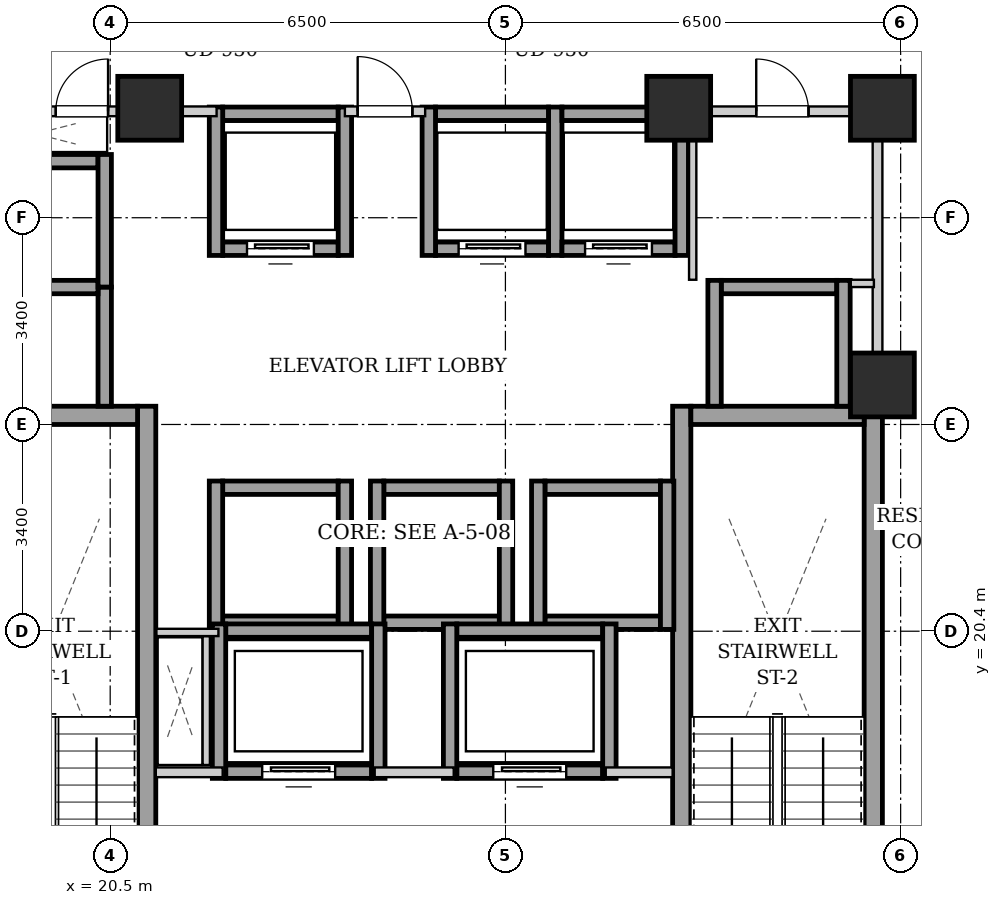
"""IFC4 building model, lengths in metres.
Left out: names, types, materials, properties, quantities, classifications, styles, units other than length and angle.
Written with IfcOpenShell. Run it as: python <this file> out.ifc"""

import sys

from ifc_helpers import new_model, si_unit, direction, frame, frame_2d, origin, origin_2d, place, context, subcontext, project, spatial, rectangle, extrude, element, fill, save


model = new_model("IFC4")
c1 = context("Model", 3, precision=1e-05, world=origin(), true_north=direction((0.0, 1.0)))
c2 = subcontext(c1, "Body", "Model", "MODEL_VIEW")
j1 = project(units=[si_unit("LENGTHUNIT", "METRE"), si_unit("PLANEANGLEUNIT", "RADIAN")], contexts=[c1])
p1 = place(None, origin())
s1 = spatial("IfcSite", under=j1, at=p1, CompositionType="ELEMENT")
p2 = place(p1, origin())
s2 = spatial("IfcBuilding", under=s1, at=p2, CompositionType="ELEMENT")
p3 = place(p2, frame((0.0, 0.0, 107.1)))
s3 = spatial("IfcBuildingStorey", under=s2, at=p3, CompositionType="ELEMENT", Elevation=107.1)
for number, where, z_axis, x_axis in (
    (1, (21.15, 29.0, 0.0), (0.0, 0.0, 1.0), (1.0, 0.0, 0.0)),
    (2, (29.85, 29.0, 0.0), (0.0, 0.0, 1.0), (1.0, 0.0, 0.0)),
    (3, (33.2, 29.0, 0.0), (0.0, 0.0, 1.0), (1.0, 0.0, 0.0)),
    (4, (33.2, 24.45, 0.0), (0.0, 0.0, 1.0), (1.0, 0.0, 0.0)),
):
    element("IfcColumn", number, at=place(p3, frame(where, z_axis=z_axis, x_axis=x_axis)), inside=s3, PredefinedType="COLUMN", context=c2, shape_type="SweptSolid", body=[
        extrude(rectangle(XDim=1.05, YDim=1.05, at=origin_2d()), origin(), (0.0, 0.0, 1.0), 3.2),
    ])
p4 = place(p3, frame((21.1, 15.1, 0.0), z_axis=(0.0, 0.0, 1.0), x_axis=(0.0, 1.0, 0.0)))
e5 = element("IfcWall", 5, at=p4, inside=s3, PredefinedType="SHEAR", context=c2, shape_type="SweptSolid", body=[
    extrude(rectangle(XDim=9.0, YDim=0.3, at=frame_2d((4.5, 0.0))), origin(), (0.0, 0.0, 1.0), 2.94),
])
p5 = place(p3, frame((18.1, 23.95, 0.0), z_axis=(0.0, 0.0, 1.0), x_axis=(1.0, 0.0, 0.0)))
e6 = element("IfcWall", 6, at=p5, inside=s3, PredefinedType="SHEAR", context=c2, shape_type="SweptSolid", body=[
    extrude(rectangle(XDim=2.85, YDim=0.3, at=frame_2d((1.425, 0.0))), origin(), (0.0, 0.0, 1.0), 2.94),
])
for number, where, z_axis, x_axis in (
    (7, (29.9, 15.1, 0.0), (0.0, 0.0, 1.0), (0.0, 1.0, 0.0)),
    (8, (33.05, 15.1, 0.0), (0.0, 0.0, 1.0), (0.0, 1.0, 0.0)),
):
    element("IfcWall", number, at=place(p3, frame(where, z_axis=z_axis, x_axis=x_axis)), inside=s3, PredefinedType="SHEAR", context=c2, shape_type="SweptSolid", body=[
        extrude(rectangle(XDim=9.0, YDim=0.3, at=frame_2d((4.5, 0.0))), origin(), (0.0, 0.0, 1.0), 2.94),
    ])
p6 = place(p3, frame((30.05, 23.95, 0.0), z_axis=(0.0, 0.0, 1.0), x_axis=(1.0, 0.0, 0.0)))
e9 = element("IfcWall", 9, at=p6, inside=s3, PredefinedType="SHEAR", context=c2, shape_type="SweptSolid", body=[
    extrude(rectangle(XDim=2.85, YDim=0.3, at=frame_2d((1.425, 0.0))), origin(), (0.0, 0.0, 1.0), 2.94),
])
p7 = place(p3, frame((22.35, 26.69, 0.0), z_axis=(0.0, 0.0, 1.0), x_axis=(1.0, 0.0, 0.0)))
e10 = element("IfcWall", 10, at=p7, inside=s3, PredefinedType="SHEAR", context=c2, shape_type="SweptSolid", body=[
    extrude(rectangle(XDim=1.9, YDim=0.22, at=frame_2d((0.95, 0.0))), origin(), (0.0, 0.0, 1.0), 2.94),
])
p8 = place(p7, frame((0.4, 0.0, 0.0)))
e11 = element("IfcOpeningElement", 11, at=p8, cuts=e10, PredefinedType="OPENING", context=c2, shape_type="SweptSolid", body=[
    extrude(rectangle(XDim=1.1, YDim=2.15, at=frame_2d((0.55, 1.075))), frame((0.0, 0.12, 0.0), z_axis=(0.0, -1.0, 0.0), x_axis=(1.0, 0.0, 0.0)), (0.0, 0.0, 1.0), 0.24),
])
p9 = place(p3, frame((22.35, 28.91, 0.0), z_axis=(0.0, 0.0, 1.0), x_axis=(1.0, 0.0, 0.0)))
e12 = element("IfcWall", 12, at=p9, inside=s3, PredefinedType="SHEAR", context=c2, shape_type="SweptSolid", body=[
    extrude(rectangle(XDim=1.9, YDim=0.22, at=frame_2d((0.95, 0.0))), origin(), (0.0, 0.0, 1.0), 2.94),
])
for number, where, z_axis, x_axis in (
    (13, (22.24, 26.58, 0.0), (0.0, 0.0, 1.0), (0.0, 1.0, 0.0)),
    (14, (24.36, 26.58, 0.0), (0.0, 0.0, 1.0), (0.0, 1.0, 0.0)),
):
    element("IfcWall", number, at=place(p3, frame(where, z_axis=z_axis, x_axis=x_axis)), inside=s3, PredefinedType="SHEAR", context=c2, shape_type="SweptSolid", body=[
        extrude(rectangle(XDim=2.44, YDim=0.22, at=frame_2d((1.22, 0.0))), origin(), (0.0, 0.0, 1.0), 2.94),
    ])
p10 = place(p3, frame((25.85, 26.69, 0.0), z_axis=(0.0, 0.0, 1.0), x_axis=(1.0, 0.0, 0.0)))
e15 = element("IfcWall", 15, at=p10, inside=s3, PredefinedType="SHEAR", context=c2, shape_type="SweptSolid", body=[
    extrude(rectangle(XDim=1.86, YDim=0.22, at=frame_2d((0.93, 0.0))), origin(), (0.0, 0.0, 1.0), 2.94),
])
p11 = place(p10, frame((0.38, 0.0, 0.0)))
e16 = element("IfcOpeningElement", 16, at=p11, cuts=e15, PredefinedType="OPENING", context=c2, shape_type="SweptSolid", body=[
    extrude(rectangle(XDim=1.1, YDim=2.15, at=frame_2d((0.55, 1.075))), frame((0.0, 0.12, 0.0), z_axis=(0.0, -1.0, 0.0), x_axis=(1.0, 0.0, 0.0)), (0.0, 0.0, 1.0), 0.24),
])
p12 = place(p3, frame((25.85, 28.91, 0.0), z_axis=(0.0, 0.0, 1.0), x_axis=(1.0, 0.0, 0.0)))
e17 = element("IfcWall", 17, at=p12, inside=s3, PredefinedType="SHEAR", context=c2, shape_type="SweptSolid", body=[
    extrude(rectangle(XDim=1.86, YDim=0.22, at=frame_2d((0.93, 0.0))), origin(), (0.0, 0.0, 1.0), 2.94),
])
for number, where, z_axis, x_axis in (
    (18, (25.74, 26.58, 0.0), (0.0, 0.0, 1.0), (0.0, 1.0, 0.0)),
    (19, (27.82, 26.58, 0.0), (0.0, 0.0, 1.0), (0.0, 1.0, 0.0)),
):
    element("IfcWall", number, at=place(p3, frame(where, z_axis=z_axis, x_axis=x_axis)), inside=s3, PredefinedType="SHEAR", context=c2, shape_type="SweptSolid", body=[
        extrude(rectangle(XDim=2.44, YDim=0.22, at=frame_2d((1.22, 0.0))), origin(), (0.0, 0.0, 1.0), 2.94),
    ])
p13 = place(p3, frame((27.93, 26.69, 0.0), z_axis=(0.0, 0.0, 1.0), x_axis=(1.0, 0.0, 0.0)))
e20 = element("IfcWall", 20, at=p13, inside=s3, PredefinedType="SHEAR", context=c2, shape_type="SweptSolid", body=[
    extrude(rectangle(XDim=1.86, YDim=0.22, at=frame_2d((0.93, 0.0))), origin(), (0.0, 0.0, 1.0), 2.94),
])
p14 = place(p13, frame((0.38, 0.0, 0.0)))
e21 = element("IfcOpeningElement", 21, at=p14, cuts=e20, PredefinedType="OPENING", context=c2, shape_type="SweptSolid", body=[
    extrude(rectangle(XDim=1.1, YDim=2.15, at=frame_2d((0.55, 1.075))), frame((0.0, 0.12, 0.0), z_axis=(0.0, -1.0, 0.0), x_axis=(1.0, 0.0, 0.0)), (0.0, 0.0, 1.0), 0.24),
])
p15 = place(p3, frame((27.93, 28.91, 0.0), z_axis=(0.0, 0.0, 1.0), x_axis=(1.0, 0.0, 0.0)))
e22 = element("IfcWall", 22, at=p15, inside=s3, PredefinedType="SHEAR", context=c2, shape_type="SweptSolid", body=[
    extrude(rectangle(XDim=1.86, YDim=0.22, at=frame_2d((0.93, 0.0))), origin(), (0.0, 0.0, 1.0), 2.94),
])
p16 = place(p3, frame((29.9, 26.58, 0.0), z_axis=(0.0, 0.0, 1.0), x_axis=(0.0, 1.0, 0.0)))
e23 = element("IfcWall", 23, at=p16, inside=s3, PredefinedType="SHEAR", context=c2, shape_type="SweptSolid", body=[
    extrude(rectangle(XDim=2.44, YDim=0.22, at=frame_2d((1.22, 0.0))), origin(), (0.0, 0.0, 1.0), 2.94),
])
for number, where, z_axis, x_axis in (
    (24, (22.35, 20.54, 0.0), (0.0, 0.0, 1.0), (1.0, 0.0, 0.0)),
    (25, (22.35, 22.76, 0.0), (0.0, 0.0, 1.0), (1.0, 0.0, 0.0)),
):
    element("IfcWall", number, at=place(p3, frame(where, z_axis=z_axis, x_axis=x_axis)), inside=s3, PredefinedType="SHEAR", context=c2, shape_type="SweptSolid", body=[
        extrude(rectangle(XDim=1.9, YDim=0.22, at=frame_2d((0.95, 0.0))), origin(), (0.0, 0.0, 1.0), 2.94),
    ])
for number, where, z_axis, x_axis in (
    (26, (22.24, 20.43, 0.0), (0.0, 0.0, 1.0), (0.0, 1.0, 0.0)),
    (27, (24.36, 20.43, 0.0), (0.0, 0.0, 1.0), (0.0, 1.0, 0.0)),
):
    element("IfcWall", number, at=place(p3, frame(where, z_axis=z_axis, x_axis=x_axis)), inside=s3, PredefinedType="SHEAR", context=c2, shape_type="SweptSolid", body=[
        extrude(rectangle(XDim=2.44, YDim=0.22, at=frame_2d((1.22, 0.0))), origin(), (0.0, 0.0, 1.0), 2.94),
    ])
for number, where, z_axis, x_axis in (
    (28, (25.0, 20.54, 0.0), (0.0, 0.0, 1.0), (1.0, 0.0, 0.0)),
    (29, (25.0, 22.76, 0.0), (0.0, 0.0, 1.0), (1.0, 0.0, 0.0)),
):
    element("IfcWall", number, at=place(p3, frame(where, z_axis=z_axis, x_axis=x_axis)), inside=s3, PredefinedType="SHEAR", context=c2, shape_type="SweptSolid", body=[
        extrude(rectangle(XDim=1.9, YDim=0.22, at=frame_2d((0.95, 0.0))), origin(), (0.0, 0.0, 1.0), 2.94),
    ])
for number, where, z_axis, x_axis in (
    (30, (24.89, 20.43, 0.0), (0.0, 0.0, 1.0), (0.0, 1.0, 0.0)),
    (31, (27.01, 20.43, 0.0), (0.0, 0.0, 1.0), (0.0, 1.0, 0.0)),
):
    element("IfcWall", number, at=place(p3, frame(where, z_axis=z_axis, x_axis=x_axis)), inside=s3, PredefinedType="SHEAR", context=c2, shape_type="SweptSolid", body=[
        extrude(rectangle(XDim=2.44, YDim=0.22, at=frame_2d((1.22, 0.0))), origin(), (0.0, 0.0, 1.0), 2.94),
    ])
for number, where, z_axis, x_axis in (
    (32, (27.65, 20.54, 0.0), (0.0, 0.0, 1.0), (1.0, 0.0, 0.0)),
    (33, (27.65, 22.76, 0.0), (0.0, 0.0, 1.0), (1.0, 0.0, 0.0)),
):
    element("IfcWall", number, at=place(p3, frame(where, z_axis=z_axis, x_axis=x_axis)), inside=s3, PredefinedType="SHEAR", context=c2, shape_type="SweptSolid", body=[
        extrude(rectangle(XDim=1.9, YDim=0.22, at=frame_2d((0.95, 0.0))), origin(), (0.0, 0.0, 1.0), 2.94),
    ])
for number, where, z_axis, x_axis in (
    (34, (27.54, 20.43, 0.0), (0.0, 0.0, 1.0), (0.0, 1.0, 0.0)),
    (35, (29.66, 20.43, 0.0), (0.0, 0.0, 1.0), (0.0, 1.0, 0.0)),
):
    element("IfcWall", number, at=place(p3, frame(where, z_axis=z_axis, x_axis=x_axis)), inside=s3, PredefinedType="SHEAR", context=c2, shape_type="SweptSolid", body=[
        extrude(rectangle(XDim=2.44, YDim=0.22, at=frame_2d((1.22, 0.0))), origin(), (0.0, 0.0, 1.0), 2.94),
    ])
p17 = place(p3, frame((20.41, 24.1, 0.0), z_axis=(0.0, 0.0, 1.0), x_axis=(0.0, 1.0, 0.0)))
e36 = element("IfcWall", 36, at=p17, inside=s3, PredefinedType="SHEAR", context=c2, shape_type="SweptSolid", body=[
    extrude(rectangle(XDim=1.96, YDim=0.22, at=frame_2d((0.98, 0.0))), origin(), (0.0, 0.0, 1.0), 2.94),
])
for number, where, z_axis, x_axis in (
    (37, (18.4, 26.06, 0.0), (0.0, 0.0, 1.0), (1.0, 0.0, 0.0)),
    (38, (18.4, 28.13, 0.0), (0.0, 0.0, 1.0), (1.0, 0.0, 0.0)),
):
    element("IfcWall", number, at=place(p3, frame(where, z_axis=z_axis, x_axis=x_axis)), inside=s3, PredefinedType="SHEAR", context=c2, shape_type="SweptSolid", body=[
        extrude(rectangle(XDim=1.9, YDim=0.22, at=frame_2d((0.95, 0.0))), origin(), (0.0, 0.0, 1.0), 2.94),
    ])
p18 = place(p3, frame((20.41, 26.06, 0.0), z_axis=(0.0, 0.0, 1.0), x_axis=(0.0, 1.0, 0.0)))
e39 = element("IfcWall", 39, at=p18, inside=s3, PredefinedType="SHEAR", context=c2, shape_type="SweptSolid", body=[
    extrude(rectangle(XDim=2.18, YDim=0.22, at=frame_2d((1.09, 0.0))), origin(), (0.0, 0.0, 1.0), 2.94),
])
p19 = place(p3, frame((30.55, 26.06, 0.0), z_axis=(0.0, 0.0, 1.0), x_axis=(1.0, 0.0, 0.0)))
e40 = element("IfcWall", 40, at=p19, inside=s3, PredefinedType="SHEAR", context=c2, shape_type="SweptSolid", body=[
    extrude(rectangle(XDim=1.9, YDim=0.22, at=frame_2d((0.95, 0.0))), origin(), (0.0, 0.0, 1.0), 2.94),
])
for number, where, z_axis, x_axis in (
    (41, (30.44, 24.1, 0.0), (0.0, 0.0, 1.0), (0.0, 1.0, 0.0)),
    (42, (32.56, 24.1, 0.0), (0.0, 0.0, 1.0), (0.0, 1.0, 0.0)),
):
    element("IfcWall", number, at=place(p3, frame(where, z_axis=z_axis, x_axis=x_axis)), inside=s3, PredefinedType="SHEAR", context=c2, shape_type="SweptSolid", body=[
        extrude(rectangle(XDim=2.07, YDim=0.22, at=frame_2d((1.035, 0.0))), origin(), (0.0, 0.0, 1.0), 2.94),
    ])
p20 = place(p3, frame((22.4, 18.09, 0.0), z_axis=(0.0, 0.0, 1.0), x_axis=(1.0, 0.0, 0.0)))
e43 = element("IfcWall", 43, at=p20, inside=s3, PredefinedType="SHEAR", context=c2, shape_type="SweptSolid", body=[
    extrude(rectangle(XDim=2.4, YDim=0.22, at=frame_2d((1.2, 0.0))), origin(), (0.0, 0.0, 1.0), 2.94),
])
p21 = place(p20, frame((0.6, 0.0, 0.0)))
e44 = element("IfcOpeningElement", 44, at=p21, cuts=e43, PredefinedType="OPENING", context=c2, shape_type="SweptSolid", body=[
    extrude(rectangle(XDim=1.2, YDim=2.15, at=frame_2d((0.6, 1.075))), frame((0.0, 0.12, 0.0), z_axis=(0.0, -1.0, 0.0), x_axis=(1.0, 0.0, 0.0)), (0.0, 0.0, 1.0), 0.24),
])
p22 = place(p3, frame((22.4, 20.41, 0.0), z_axis=(0.0, 0.0, 1.0), x_axis=(1.0, 0.0, 0.0)))
e45 = element("IfcWall", 45, at=p22, inside=s3, PredefinedType="SHEAR", context=c2, shape_type="SweptSolid", body=[
    extrude(rectangle(XDim=2.4, YDim=0.22, at=frame_2d((1.2, 0.0))), origin(), (0.0, 0.0, 1.0), 2.94),
])
for number, where, z_axis, x_axis in (
    (46, (22.29, 17.98, 0.0), (0.0, 0.0, 1.0), (0.0, 1.0, 0.0)),
    (47, (24.91, 17.98, 0.0), (0.0, 0.0, 1.0), (0.0, 1.0, 0.0)),
):
    element("IfcWall", number, at=place(p3, frame(where, z_axis=z_axis, x_axis=x_axis)), inside=s3, PredefinedType="SHEAR", context=c2, shape_type="SweptSolid", body=[
        extrude(rectangle(XDim=2.54, YDim=0.22, at=frame_2d((1.27, 0.0))), origin(), (0.0, 0.0, 1.0), 2.94),
    ])
p23 = place(p3, frame((26.2, 18.09, 0.0), z_axis=(0.0, 0.0, 1.0), x_axis=(1.0, 0.0, 0.0)))
e48 = element("IfcWall", 48, at=p23, inside=s3, PredefinedType="SHEAR", context=c2, shape_type="SweptSolid", body=[
    extrude(rectangle(XDim=2.4, YDim=0.22, at=frame_2d((1.2, 0.0))), origin(), (0.0, 0.0, 1.0), 2.94),
])
p24 = place(p23, frame((0.6, 0.0, 0.0)))
e49 = element("IfcOpeningElement", 49, at=p24, cuts=e48, PredefinedType="OPENING", context=c2, shape_type="SweptSolid", body=[
    extrude(rectangle(XDim=1.2, YDim=2.15, at=frame_2d((0.6, 1.075))), frame((0.0, 0.12, 0.0), z_axis=(0.0, -1.0, 0.0), x_axis=(1.0, 0.0, 0.0)), (0.0, 0.0, 1.0), 0.24),
])
p25 = place(p3, frame((26.2, 20.41, 0.0), z_axis=(0.0, 0.0, 1.0), x_axis=(1.0, 0.0, 0.0)))
e50 = element("IfcWall", 50, at=p25, inside=s3, PredefinedType="SHEAR", context=c2, shape_type="SweptSolid", body=[
    extrude(rectangle(XDim=2.4, YDim=0.22, at=frame_2d((1.2, 0.0))), origin(), (0.0, 0.0, 1.0), 2.94),
])
for number, where, z_axis, x_axis in (
    (51, (26.09, 17.98, 0.0), (0.0, 0.0, 1.0), (0.0, 1.0, 0.0)),
    (52, (28.71, 17.98, 0.0), (0.0, 0.0, 1.0), (0.0, 1.0, 0.0)),
):
    element("IfcWall", number, at=place(p3, frame(where, z_axis=z_axis, x_axis=x_axis)), inside=s3, PredefinedType="SHEAR", context=c2, shape_type="SweptSolid", body=[
        extrude(rectangle(XDim=2.54, YDim=0.22, at=frame_2d((1.27, 0.0))), origin(), (0.0, 0.0, 1.0), 2.94),
    ])
p26 = place(p3, frame((21.25, 18.08, 0.0), z_axis=(0.0, 0.0, 1.0), x_axis=(1.0, 0.0, 0.0)))
e53 = element("IfcWall", 53, at=p26, inside=s3, PredefinedType="PARTITIONING", context=c2, shape_type="SweptSolid", body=[
    extrude(rectangle(XDim=1.1, YDim=0.16, at=frame_2d((0.55, 0.0))), origin(), (0.0, 0.0, 1.0), 2.94),
])
p27 = place(p3, frame((24.85, 18.08, 0.0), z_axis=(0.0, 0.0, 1.0), x_axis=(1.0, 0.0, 0.0)))
e54 = element("IfcWall", 54, at=p27, inside=s3, PredefinedType="PARTITIONING", context=c2, shape_type="SweptSolid", body=[
    extrude(rectangle(XDim=1.3, YDim=0.16, at=frame_2d((0.65, 0.0))), origin(), (0.0, 0.0, 1.0), 2.94),
])
p28 = place(p3, frame((28.65, 18.08, 0.0), z_axis=(0.0, 0.0, 1.0), x_axis=(1.0, 0.0, 0.0)))
e55 = element("IfcWall", 55, at=p28, inside=s3, PredefinedType="PARTITIONING", context=c2, shape_type="SweptSolid", body=[
    extrude(rectangle(XDim=1.1, YDim=0.16, at=frame_2d((0.55, 0.0))), origin(), (0.0, 0.0, 1.0), 2.94),
])
p29 = place(p3, frame((33.12, 24.12, 0.0), z_axis=(0.0, 0.0, 1.0), x_axis=(0.0, 1.0, 0.0)))
e56 = element("IfcWall", 56, at=p29, inside=s3, PredefinedType="PARTITIONING", context=c2, shape_type="SweptSolid", body=[
    extrude(rectangle(XDim=4.76, YDim=0.16, at=frame_2d((2.38, 0.0))), origin(), (0.0, 0.0, 1.0), 2.275),
])
p30 = place(p3, frame((24.36, 28.95, 0.0), z_axis=(0.0, 0.0, 1.0), x_axis=(1.0, 0.0, 0.0)))
e57 = element("IfcWall", 57, at=p30, inside=s3, PredefinedType="PARTITIONING", context=c2, shape_type="SweptSolid", body=[
    extrude(rectangle(XDim=1.32, YDim=0.16, at=frame_2d((0.66, 0.0))), origin(), (0.0, 0.0, 1.0), 2.313),
])
p31 = place(p30, frame((0.21, 0.0, 0.0)))
e58 = element("IfcOpeningElement", 58, at=p31, cuts=e57, PredefinedType="OPENING", context=c2, shape_type="SweptSolid", body=[
    extrude(rectangle(XDim=0.9, YDim=2.05, at=frame_2d((0.45, 1.025))), frame((0.0, 0.09, 0.0), z_axis=(0.0, -1.0, 0.0), x_axis=(1.0, 0.0, 0.0)), (0.0, 0.0, 1.0), 0.18),
])
p32 = place(p3, frame((17.96, 28.95, 0.0), z_axis=(0.0, 0.0, 1.0), x_axis=(1.0, 0.0, 0.0)))
e59 = element("IfcWall", 59, at=p32, inside=s3, PredefinedType="PARTITIONING", context=c2, shape_type="SweptSolid", body=[
    extrude(rectangle(XDim=4.29, YDim=0.16, at=frame_2d((2.145, 0.0))), origin(), (0.0, 0.0, 1.0), 2.313),
])
p33 = place(p32, frame((1.645, 0.0, 0.0)))
e60 = element("IfcOpeningElement", 60, at=p33, cuts=e59, PredefinedType="OPENING", context=c2, shape_type="SweptSolid", body=[
    extrude(rectangle(XDim=0.86, YDim=2.05, at=frame_2d((0.43, 1.025))), frame((0.0, 0.09, 0.0), z_axis=(0.0, -1.0, 0.0), x_axis=(1.0, 0.0, 0.0)), (0.0, 0.0, 1.0), 0.18),
])
p34 = place(p3, frame((22.08, 18.2, 0.0), z_axis=(0.0, 0.0, 1.0), x_axis=(0.0, 1.0, 0.0)))
e61 = element("IfcWall", 61, at=p34, inside=s3, PredefinedType="PARTITIONING", context=c2, shape_type="SweptSolid", body=[
    extrude(rectangle(XDim=2.12, YDim=0.12, at=frame_2d((1.06, 0.0))), origin(), (0.0, 0.0, 1.0), 2.94),
])
p35 = place(p3, frame((22.28, 20.38, 0.0), z_axis=(0.0, 0.0, 1.0), x_axis=(-1.0, 0.0, 0.0)))
e62 = element("IfcWall", 62, at=p35, inside=s3, PredefinedType="PARTITIONING", context=c2, shape_type="SweptSolid", body=[
    extrude(rectangle(XDim=1.02, YDim=0.12, at=frame_2d((0.51, 0.0))), origin(), (0.0, 0.0, 1.0), 2.94),
])
p36 = place(p3, frame((30.08, 26.18, 0.0), z_axis=(0.0, 0.0, 1.0), x_axis=(0.0, 1.0, 0.0)))
e63 = element("IfcWall", 63, at=p36, inside=s3, PredefinedType="PARTITIONING", context=c2, shape_type="SweptSolid", body=[
    extrude(rectangle(XDim=2.68, YDim=0.12, at=frame_2d((1.34, 0.0))), origin(), (0.0, 0.0, 1.0), 2.94),
])
p37 = place(p3, frame((32.68, 26.12, 0.0), z_axis=(0.0, 0.0, 1.0), x_axis=(1.0, 0.0, 0.0)))
e64 = element("IfcWall", 64, at=p37, inside=s3, PredefinedType="PARTITIONING", context=c2, shape_type="SweptSolid", body=[
    extrude(rectangle(XDim=0.38, YDim=0.12, at=frame_2d((0.19, 0.0))), origin(), (0.0, 0.0, 1.0), 2.94),
])
p38 = place(p3, frame((30.08, 28.95, 0.0), z_axis=(0.0, 0.0, 1.0), x_axis=(1.0, 0.0, 0.0)))
e65 = element("IfcWall", 65, at=p38, inside=s3, PredefinedType="PARTITIONING", context=c2, shape_type="SweptSolid", body=[
    extrude(rectangle(XDim=2.96, YDim=0.16, at=frame_2d((1.48, 0.0))), origin(), (0.0, 0.0, 1.0), 2.94),
])
p39 = place(p38, frame((1.045, 0.0, 0.0)))
e66 = element("IfcOpeningElement", 66, at=p39, cuts=e65, PredefinedType="OPENING", context=c2, shape_type="SweptSolid", body=[
    extrude(rectangle(XDim=0.86, YDim=2.05, at=frame_2d((0.43, 1.025))), frame((0.0, 0.09, 0.0), z_axis=(0.0, -1.0, 0.0), x_axis=(1.0, 0.0, 0.0)), (0.0, 0.0, 1.0), 0.18),
])
p40 = place(p8, origin())
e67 = element("IfcDoor", 67, at=p40, inside=s3, OperationType="SLIDING_TO_LEFT", PredefinedType="DOOR", context=c2, shape_type="SweptSolid", body=[
    extrude(rectangle(XDim=1.1, YDim=2.15, at=frame_2d((0.55, 1.075))), frame((0.0, 0.025, 0.0), z_axis=(0.0, -1.0, 0.0), x_axis=(1.0, 0.0, 0.0)), (0.0, 0.0, 1.0), 0.05),
])
fill(e11, e67)
p41 = place(p11, origin())
e68 = element("IfcDoor", 68, at=p41, inside=s3, OperationType="SLIDING_TO_LEFT", PredefinedType="DOOR", context=c2, shape_type="SweptSolid", body=[
    extrude(rectangle(XDim=1.1, YDim=2.15, at=frame_2d((0.55, 1.075))), frame((0.0, 0.025, 0.0), z_axis=(0.0, -1.0, 0.0), x_axis=(1.0, 0.0, 0.0)), (0.0, 0.0, 1.0), 0.05),
])
fill(e16, e68)
p42 = place(p14, origin())
e69 = element("IfcDoor", 69, at=p42, inside=s3, OperationType="SLIDING_TO_LEFT", PredefinedType="DOOR", context=c2, shape_type="SweptSolid", body=[
    extrude(rectangle(XDim=1.1, YDim=2.15, at=frame_2d((0.55, 1.075))), frame((0.0, 0.025, 0.0), z_axis=(0.0, -1.0, 0.0), x_axis=(1.0, 0.0, 0.0)), (0.0, 0.0, 1.0), 0.05),
])
fill(e21, e69)
p43 = place(p21, origin())
e70 = element("IfcDoor", 70, at=p43, inside=s3, OperationType="SLIDING_TO_LEFT", PredefinedType="DOOR", context=c2, shape_type="SweptSolid", body=[
    extrude(rectangle(XDim=1.2, YDim=2.15, at=frame_2d((0.6, 1.075))), frame((0.0, 0.025, 0.0), z_axis=(0.0, -1.0, 0.0), x_axis=(1.0, 0.0, 0.0)), (0.0, 0.0, 1.0), 0.05),
])
fill(e44, e70)
p44 = place(p24, origin())
e71 = element("IfcDoor", 71, at=p44, inside=s3, OperationType="SLIDING_TO_LEFT", PredefinedType="DOOR", context=c2, shape_type="SweptSolid", body=[
    extrude(rectangle(XDim=1.2, YDim=2.15, at=frame_2d((0.6, 1.075))), frame((0.0, 0.025, 0.0), z_axis=(0.0, -1.0, 0.0), x_axis=(1.0, 0.0, 0.0)), (0.0, 0.0, 1.0), 0.05),
])
fill(e49, e71)
p45 = place(p31, origin())
e72 = element("IfcDoor", 72, at=p45, inside=s3, OperationType="SINGLE_SWING_LEFT", PredefinedType="DOOR", context=c2, shape_type="SweptSolid", body=[
    extrude(rectangle(XDim=0.9, YDim=2.05, at=frame_2d((0.45, 1.025))), frame((0.0, 0.025, 0.0), z_axis=(0.0, -1.0, 0.0), x_axis=(1.0, 0.0, 0.0)), (0.0, 0.0, 1.0), 0.05),
])
fill(e58, e72)
p46 = place(p33, origin())
e73 = element("IfcDoor", 73, at=p46, inside=s3, OperationType="SINGLE_SWING_RIGHT", PredefinedType="DOOR", context=c2, shape_type="SweptSolid", body=[
    extrude(rectangle(XDim=0.86, YDim=2.05, at=frame_2d((0.43, 1.025))), frame((0.0, 0.025, 0.0), z_axis=(0.0, -1.0, 0.0), x_axis=(1.0, 0.0, 0.0)), (0.0, 0.0, 1.0), 0.05),
])
fill(e60, e73)
p47 = place(p39, origin())
e74 = element("IfcDoor", 74, at=p47, inside=s3, OperationType="SINGLE_SWING_LEFT", PredefinedType="DOOR", context=c2, shape_type="SweptSolid", body=[
    extrude(rectangle(XDim=0.86, YDim=2.05, at=frame_2d((0.43, 1.025))), frame((0.0, 0.025, 0.0), z_axis=(0.0, -1.0, 0.0), x_axis=(1.0, 0.0, 0.0)), (0.0, 0.0, 1.0), 0.05),
])
fill(e66, e74)
save(model, sys.argv[1])
